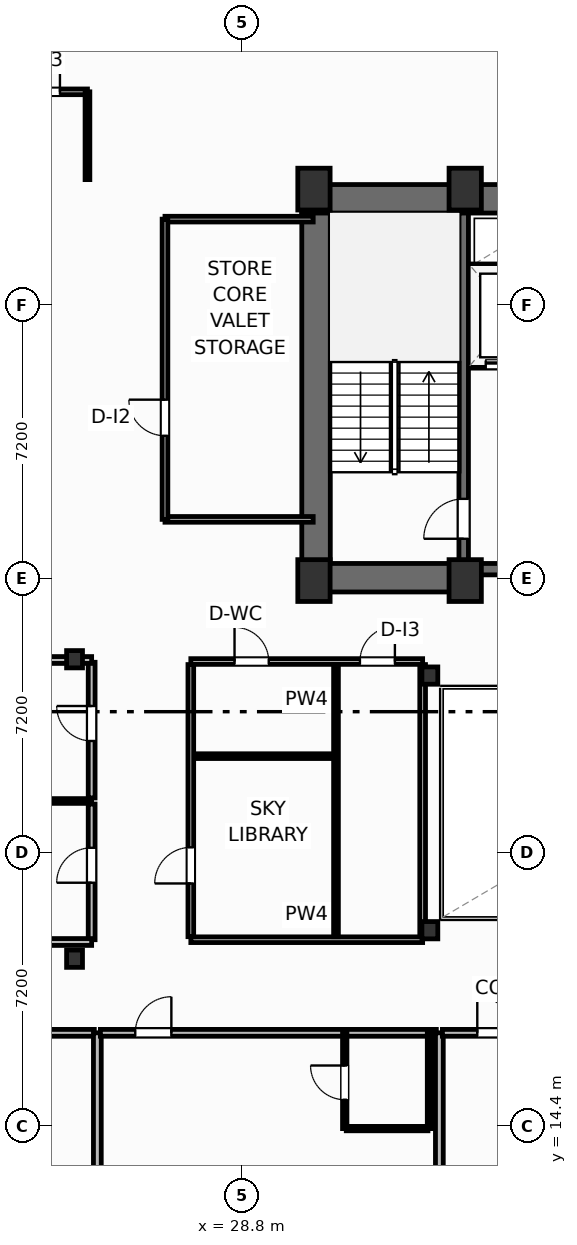
"""IFC4 building model, lengths in metres.
Left out: names, types, materials, properties, quantities, classifications, styles, units other than length and angle.
Written with IfcOpenShell. Run it as: python <this file> out.ifc"""

import sys

from ifc_helpers import new_model, si_unit, direction, frame, frame_2d, origin, origin_2d, place, context, subcontext, project, spatial, rectangle, i_section, extrude, element, fill, save


model = new_model("IFC4")
c1 = context("Model", 3, precision=1e-05, world=origin(), true_north=direction((0.0, 1.0)))
c2 = subcontext(c1, "Body", "Model", "MODEL_VIEW")
j1 = project(units=[si_unit("LENGTHUNIT", "METRE"), si_unit("PLANEANGLEUNIT", "RADIAN")], contexts=[c1])
p1 = place(None, origin())
s1 = spatial("IfcSite", under=j1, at=p1, CompositionType="ELEMENT")
p2 = place(p1, origin())
s2 = spatial("IfcBuilding", under=s1, at=p2, CompositionType="ELEMENT")
p3 = place(p2, frame((0.0, 0.0, 151.3)))
s3 = spatial("IfcBuildingStorey", under=s2, at=p3, CompositionType="ELEMENT", Elevation=151.3)
for number, where, z_axis, x_axis in (
    (1, (30.7, 28.75, 0.0), (0.0, 0.0, 1.0), (1.0, 0.0, 0.0)),
    (2, (34.68, 28.75, 0.0), (0.0, 0.0, 1.0), (1.0, 0.0, 0.0)),
    (3, (30.7, 39.05, 0.0), (0.0, 0.0, 1.0), (1.0, 0.0, 0.0)),
    (4, (34.68, 39.05, 0.0), (0.0, 0.0, 1.0), (1.0, 0.0, 0.0)),
):
    element("IfcColumn", number, at=place(p3, frame(where, z_axis=z_axis, x_axis=x_axis)), inside=s3, PredefinedType="COLUMN", context=c2, shape_type="SweptSolid", body=[
        extrude(rectangle(XDim=0.85, YDim=1.1, at=origin_2d()), origin(), (0.0, 0.0, 1.0), 3.7),
    ])
for number, where, z_axis, x_axis in (
    (5, (33.75, 19.55, 0.0), (0.0, 0.0, 1.0), (1.0, 0.0, 0.0)),
    (6, (33.75, 26.25, 0.0), (0.0, 0.0, 1.0), (1.0, 0.0, 0.0)),
    (7, (24.4, 18.8, 0.0), (0.0, 0.0, 1.0), (1.0, 0.0, 0.0)),
    (8, (24.4, 26.68, 0.0), (0.0, 0.0, 1.0), (1.0, 0.0, 0.0)),
):
    element("IfcColumn", number, at=place(p3, frame(where, z_axis=z_axis, x_axis=x_axis)), inside=s3, PredefinedType="COLUMN", context=c2, shape_type="SweptSolid", body=[
        extrude(i_section(OverallWidth=0.418, OverallDepth=0.455, WebThickness=0.042, FlangeThickness=0.068, FilletRadius=0.025, at=origin_2d()), origin(), (0.0, 0.0, 1.0), 3.7),
    ])
p4 = place(p3, frame((30.38, 38.795, 0.0), z_axis=(0.0, 0.0, 1.0), x_axis=(1.0, 0.0, 0.0)))
e9 = element("IfcWall", 9, at=p4, inside=s3, PredefinedType="SHEAR", context=c2, shape_type="SweptSolid", body=[
    extrude(rectangle(XDim=17.64, YDim=0.75, at=frame_2d((8.82, 0.0))), origin(), (0.0, 0.0, 1.0), 3.45),
])
p5 = place(p3, frame((30.755, 29.2, 0.0), z_axis=(0.0, 0.0, 1.0), x_axis=(0.0, 1.0, 0.0)))
e10 = element("IfcWall", 10, at=p5, inside=s3, PredefinedType="SHEAR", context=c2, shape_type="SweptSolid", body=[
    extrude(rectangle(XDim=9.22, YDim=0.75, at=frame_2d((4.61, 0.0))), origin(), (0.0, 0.0, 1.0), 3.45),
])
p6 = place(p3, frame((30.38, 28.825, 0.0), z_axis=(0.0, 0.0, 1.0), x_axis=(1.0, 0.0, 0.0)))
e11 = element("IfcWall", 11, at=p6, inside=s3, PredefinedType="SHEAR", context=c2, shape_type="SweptSolid", body=[
    extrude(rectangle(XDim=4.42, YDim=0.75, at=frame_2d((2.21, 0.0))), origin(), (0.0, 0.0, 1.0), 3.45),
])
p7 = place(p3, frame((34.8, 29.05, 0.0), z_axis=(0.0, 0.0, 1.0), x_axis=(1.0, 0.0, 0.0)))
e12 = element("IfcWall", 12, at=p7, inside=s3, PredefinedType="SHEAR", context=c2, shape_type="SweptSolid", body=[
    extrude(rectangle(XDim=8.8, YDim=0.3, at=frame_2d((4.4, 0.0))), origin(), (0.0, 0.0, 1.0), 3.45),
])
p8 = place(p7, frame((0.95, 0.0, 0.0)))
e13 = element("IfcOpeningElement", 13, at=p8, cuts=e12, PredefinedType="OPENING", context=c2, shape_type="SweptSolid", body=[
    extrude(rectangle(XDim=1.1, YDim=2.15, at=frame_2d((0.55, 1.075))), frame((0.0, 0.16, 0.0), z_axis=(0.0, -1.0, 0.0), x_axis=(1.0, 0.0, 0.0)), (0.0, 0.0, 1.0), 0.32),
])
p9 = place(p7, frame((6.75, 0.0, 0.0)))
e14 = element("IfcOpeningElement", 14, at=p9, cuts=e12, PredefinedType="OPENING", context=c2, shape_type="SweptSolid", body=[
    extrude(rectangle(XDim=1.1, YDim=2.15, at=frame_2d((0.55, 1.075))), frame((0.0, 0.16, 0.0), z_axis=(0.0, -1.0, 0.0), x_axis=(1.0, 0.0, 0.0)), (0.0, 0.0, 1.0), 0.32),
])
p10 = place(p7, frame((3.32, 0.0, 0.0)))
e15 = element("IfcOpeningElement", 15, at=p10, cuts=e12, PredefinedType="OPENING", context=c2, shape_type="SweptSolid", body=[
    extrude(rectangle(XDim=0.95, YDim=2.15, at=frame_2d((0.475, 1.075))), frame((0.0, 0.16, 0.0), z_axis=(0.0, -1.0, 0.0), x_axis=(1.0, 0.0, 0.0)), (0.0, 0.0, 1.0), 0.32),
])
p11 = place(p3, frame((34.64, 29.2, 0.0), z_axis=(0.0, 0.0, 1.0), x_axis=(0.0, 1.0, 0.0)))
e16 = element("IfcWall", 16, at=p11, inside=s3, PredefinedType="SHEAR", context=c2, shape_type="SweptSolid", body=[
    extrude(rectangle(XDim=9.22, YDim=0.25, at=frame_2d((4.61, 0.0))), origin(), (0.0, 0.0, 1.0), 3.45),
])
p12 = place(p11, frame((0.65, 0.0, 0.0)))
e17 = element("IfcOpeningElement", 17, at=p12, cuts=e16, PredefinedType="OPENING", context=c2, shape_type="SweptSolid", body=[
    extrude(rectangle(XDim=1.05, YDim=2.15, at=frame_2d((0.525, 1.075))), frame((0.0, 0.135, 0.0), z_axis=(0.0, -1.0, 0.0), x_axis=(1.0, 0.0, 0.0)), (0.0, 0.0, 1.0), 0.27),
])
p13 = place(p3, frame((5.0, 41.61, 0.0), z_axis=(0.0, 0.0, 1.0), x_axis=(1.0, 0.0, 0.0)))
e18 = element("IfcWall", 18, at=p13, inside=s3, PredefinedType="PARTITIONING", context=c2, shape_type="SweptSolid", body=[
    extrude(rectangle(XDim=19.74, YDim=0.15, at=frame_2d((9.87, 0.0))), origin(), (0.0, 0.0, 1.0), 3.45),
])
p14 = place(p13, frame((18.096, 0.0, 0.0)))
e19 = element("IfcOpeningElement", 19, at=p14, cuts=e18, PredefinedType="OPENING", context=c2, shape_type="SweptSolid", body=[
    extrude(rectangle(XDim=0.92, YDim=2.05, at=frame_2d((0.46, 1.025))), frame((0.0, 0.085, 0.0), z_axis=(0.0, -1.0, 0.0), x_axis=(1.0, 0.0, 0.0)), (0.0, 0.0, 1.0), 0.17),
])
p15 = place(p3, frame((24.74, 39.3, 0.0), z_axis=(0.0, 0.0, 1.0), x_axis=(0.0, 1.0, 0.0)))
e20 = element("IfcWall", 20, at=p15, inside=s3, PredefinedType="PARTITIONING", context=c2, shape_type="SweptSolid", body=[
    extrude(rectangle(XDim=2.31, YDim=0.125, at=frame_2d((1.155, 0.0))), origin(), (0.0, 0.0, 1.0), 3.45),
])
p16 = place(p3, frame((16.08, 16.85, 0.0), z_axis=(0.0, 0.0, 1.0), x_axis=(1.0, 0.0, 0.0)))
e21 = element("IfcWall", 21, at=p16, inside=s3, PredefinedType="PARTITIONING", context=c2, shape_type="SweptSolid", body=[
    extrude(rectangle(XDim=8.84, YDim=0.18, at=frame_2d((4.42, 0.0))), origin(), (0.0, 0.0, 1.0), 3.45),
])
p17 = place(p16, frame((3.308, 0.0, 0.0)))
e22 = element("IfcOpeningElement", 22, at=p17, cuts=e21, PredefinedType="OPENING", context=c2, shape_type="SweptSolid", body=[
    extrude(rectangle(XDim=0.95, YDim=2.15, at=frame_2d((0.475, 1.075))), frame((0.0, 0.1, 0.0), z_axis=(0.0, -1.0, 0.0), x_axis=(1.0, 0.0, 0.0)), (0.0, 0.0, 1.0), 0.2),
])
p18 = place(p3, frame((25.0, 3.591, 0.0), z_axis=(0.0, 0.0, 1.0), x_axis=(0.0, 1.0, 0.0)))
e23 = element("IfcWall", 23, at=p18, inside=s3, PredefinedType="PARTITIONING", context=c2, shape_type="SweptSolid", body=[
    extrude(rectangle(XDim=13.259, YDim=0.205, at=frame_2d((6.629, 0.0))), origin(), (0.0, 0.0, 1.0), 2.662),
])
p19 = place(p3, frame((25.08, 16.85, 0.0), z_axis=(0.0, 0.0, 1.0), x_axis=(1.0, 0.0, 0.0)))
e24 = element("IfcWall", 24, at=p19, inside=s3, PredefinedType="PARTITIONING", context=c2, shape_type="SweptSolid", body=[
    extrude(rectangle(XDim=8.84, YDim=0.18, at=frame_2d((4.42, 0.0))), origin(), (0.0, 0.0, 1.0), 3.45),
])
p20 = place(p19, frame((0.918, 0.0, 0.0)))
e25 = element("IfcOpeningElement", 25, at=p20, cuts=e24, PredefinedType="OPENING", context=c2, shape_type="SweptSolid", body=[
    extrude(rectangle(XDim=0.95, YDim=2.15, at=frame_2d((0.475, 1.075))), frame((0.0, 0.1, 0.0), z_axis=(0.0, -1.0, 0.0), x_axis=(1.0, 0.0, 0.0)), (0.0, 0.0, 1.0), 0.2),
])
p21 = place(p3, frame((31.55, 14.33, 0.0), z_axis=(0.0, 0.0, 1.0), x_axis=(1.0, 0.0, 0.0)))
e26 = element("IfcWall", 26, at=p21, inside=s3, PredefinedType="PARTITIONING", context=c2, shape_type="SweptSolid", body=[
    extrude(rectangle(XDim=2.15, YDim=0.115, at=frame_2d((1.075, 0.0))), origin(), (0.0, 0.0, 1.0), 3.45),
])
p22 = place(p3, frame((31.51, 14.33, 0.0), z_axis=(0.0, 0.0, 1.0), x_axis=(0.0, 1.0, 0.0)))
e27 = element("IfcWall", 27, at=p22, inside=s3, PredefinedType="PARTITIONING", context=c2, shape_type="SweptSolid", body=[
    extrude(rectangle(XDim=2.52, YDim=0.115, at=frame_2d((1.26, 0.0))), origin(), (0.0, 0.0, 1.0), 3.45),
])
p23 = place(p22, frame((0.76, 0.0, 0.0)))
e28 = element("IfcOpeningElement", 28, at=p23, cuts=e27, PredefinedType="OPENING", context=c2, shape_type="SweptSolid", body=[
    extrude(rectangle(XDim=0.9, YDim=2.05, at=frame_2d((0.45, 1.025))), frame((0.0, 0.067, 0.0), z_axis=(0.0, -1.0, 0.0), x_axis=(1.0, 0.0, 0.0)), (0.0, 0.0, 1.0), 0.135),
])
p24 = place(p3, frame((33.74, 14.33, 0.0), z_axis=(0.0, 0.0, 1.0), x_axis=(0.0, 1.0, 0.0)))
e29 = element("IfcWall", 29, at=p24, inside=s3, PredefinedType="PARTITIONING", context=c2, shape_type="SweptSolid", body=[
    extrude(rectangle(XDim=2.52, YDim=0.115, at=frame_2d((1.26, 0.0))), origin(), (0.0, 0.0, 1.0), 3.45),
])
p25 = place(p3, frame((34.0, 2.5, 0.0), z_axis=(0.0, 0.0, 1.0), x_axis=(0.0, 1.0, 0.0)))
e30 = element("IfcWall", 30, at=p25, inside=s3, PredefinedType="PARTITIONING", context=c2, shape_type="SweptSolid", body=[
    extrude(rectangle(XDim=14.35, YDim=0.205, at=frame_2d((7.175, 0.0))), origin(), (0.0, 0.0, 1.0), 3.45),
])
p26 = place(p3, frame((34.08, 16.85, 0.0), z_axis=(0.0, 0.0, 1.0), x_axis=(1.0, 0.0, 0.0)))
e31 = element("IfcWall", 31, at=p26, inside=s3, PredefinedType="PARTITIONING", context=c2, shape_type="SweptSolid", body=[
    extrude(rectangle(XDim=8.84, YDim=0.18, at=frame_2d((4.42, 0.0))), origin(), (0.0, 0.0, 1.0), 3.45),
])
p27 = place(p26, frame((0.918, 0.0, 0.0)))
e32 = element("IfcOpeningElement", 32, at=p27, cuts=e31, PredefinedType="OPENING", context=c2, shape_type="SweptSolid", body=[
    extrude(rectangle(XDim=0.95, YDim=2.15, at=frame_2d((0.475, 1.075))), frame((0.0, 0.1, 0.0), z_axis=(0.0, -1.0, 0.0), x_axis=(1.0, 0.0, 0.0)), (0.0, 0.0, 1.0), 0.2),
])
p28 = place(p3, frame((24.85, 19.3, 0.0), z_axis=(0.0, 0.0, 1.0), x_axis=(0.0, 1.0, 0.0)))
e33 = element("IfcWall", 33, at=p28, inside=s3, PredefinedType="PARTITIONING", context=c2, shape_type="SweptSolid", body=[
    extrude(rectangle(XDim=3.57, YDim=0.18, at=frame_2d((1.785, 0.0))), origin(), (0.0, 0.0, 1.0), 3.45),
])
p29 = place(p28, frame((1.5, 0.0, 0.0)))
e34 = element("IfcOpeningElement", 34, at=p29, cuts=e33, PredefinedType="OPENING", context=c2, shape_type="SweptSolid", body=[
    extrude(rectangle(XDim=0.92, YDim=2.05, at=frame_2d((0.46, 1.025))), frame((0.0, 0.1, 0.0), z_axis=(0.0, -1.0, 0.0), x_axis=(1.0, 0.0, 0.0)), (0.0, 0.0, 1.0), 0.2),
])
p30 = place(p3, frame((24.85, 23.03, 0.0), z_axis=(0.0, 0.0, 1.0), x_axis=(0.0, 1.0, 0.0)))
e35 = element("IfcWall", 35, at=p30, inside=s3, PredefinedType="PARTITIONING", context=c2, shape_type="SweptSolid", body=[
    extrude(rectangle(XDim=3.57, YDim=0.18, at=frame_2d((1.785, 0.0))), origin(), (0.0, 0.0, 1.0), 3.45),
])
p31 = place(p30, frame((1.5, 0.0, 0.0)))
e36 = element("IfcOpeningElement", 36, at=p31, cuts=e35, PredefinedType="OPENING", context=c2, shape_type="SweptSolid", body=[
    extrude(rectangle(XDim=0.92, YDim=2.05, at=frame_2d((0.46, 1.025))), frame((0.0, 0.1, 0.0), z_axis=(0.0, -1.0, 0.0), x_axis=(1.0, 0.0, 0.0)), (0.0, 0.0, 1.0), 0.2),
])
p32 = place(p3, frame((1.624, 22.95, 0.0), z_axis=(0.0, 0.0, 1.0), x_axis=(1.0, 0.0, 0.0)))
e37 = element("IfcWall", 37, at=p32, inside=s3, PredefinedType="PARTITIONING", context=c2, shape_type="SweptSolid", body=[
    extrude(rectangle(XDim=23.226, YDim=0.125, at=frame_2d((11.613, 0.0))), origin(), (0.0, 0.0, 1.0), 3.45),
])
p33 = place(p3, frame((1.174, 19.24, 0.0), z_axis=(0.0, 0.0, 1.0), x_axis=(1.0, 0.0, 0.0)))
e38 = element("IfcWall", 38, at=p33, inside=s3, PredefinedType="PARTITIONING", context=c2, shape_type="SweptSolid", body=[
    extrude(rectangle(XDim=23.676, YDim=0.18, at=frame_2d((11.838, 0.0))), origin(), (0.0, 0.0, 1.0), 3.45),
])
p34 = place(p3, frame((2.073, 26.66, 0.0), z_axis=(0.0, 0.0, 1.0), x_axis=(1.0, 0.0, 0.0)))
e39 = element("IfcWall", 39, at=p34, inside=s3, PredefinedType="PARTITIONING", context=c2, shape_type="SweptSolid", body=[
    extrude(rectangle(XDim=22.777, YDim=0.18, at=frame_2d((11.388, 0.0))), origin(), (0.0, 0.0, 1.0), 2.662),
])
p35 = place(p3, frame((34.8, 34.44, 0.0), z_axis=(0.0, 0.0, 1.0), x_axis=(1.0, 0.0, 0.0)))
e40 = element("IfcWall", 40, at=p35, inside=s3, PredefinedType="PARTITIONING", context=c2, shape_type="SweptSolid", body=[
    extrude(rectangle(XDim=2.18, YDim=0.2, at=frame_2d((1.09, 0.0))), origin(), (0.0, 0.0, 1.0), 3.45),
])
p36 = place(p35, frame((0.42, 0.0, 0.0)))
e41 = element("IfcOpeningElement", 41, at=p36, cuts=e40, PredefinedType="OPENING", context=c2, shape_type="SweptSolid", body=[
    extrude(rectangle(XDim=1.2, YDim=2.2, at=frame_2d((0.6, 1.1))), frame((0.0, 0.11, 0.0), z_axis=(0.0, -1.0, 0.0), x_axis=(1.0, 0.0, 0.0)), (0.0, 0.0, 1.0), 0.22),
])
p37 = place(p3, frame((34.8, 36.98, 0.0), z_axis=(0.0, 0.0, 1.0), x_axis=(1.0, 0.0, 0.0)))
e42 = element("IfcWall", 42, at=p37, inside=s3, PredefinedType="PARTITIONING", context=c2, shape_type="SweptSolid", body=[
    extrude(rectangle(XDim=2.18, YDim=0.2, at=frame_2d((1.09, 0.0))), origin(), (0.0, 0.0, 1.0), 3.45),
])
p38 = place(p3, frame((27.46, 19.3, 0.0), z_axis=(0.0, 0.0, 1.0), x_axis=(1.0, 0.0, 0.0)))
e43 = element("IfcWall", 43, at=p38, inside=s3, PredefinedType="PARTITIONING", context=c2, shape_type="SweptSolid", body=[
    extrude(rectangle(XDim=6.1, YDim=0.15, at=frame_2d((3.05, 0.0))), origin(), (0.0, 0.0, 1.0), 2.662),
])
p39 = place(p3, frame((27.46, 26.62, 0.0), z_axis=(0.0, 0.0, 1.0), x_axis=(1.0, 0.0, 0.0)))
e44 = element("IfcWall", 44, at=p39, inside=s3, PredefinedType="PARTITIONING", context=c2, shape_type="SweptSolid", body=[
    extrude(rectangle(XDim=6.1, YDim=0.15, at=frame_2d((3.05, 0.0))), origin(), (0.0, 0.0, 1.0), 2.662),
])
p40 = place(p39, frame((1.15, 0.0, 0.0)))
e45 = element("IfcOpeningElement", 45, at=p40, cuts=e44, PredefinedType="OPENING", context=c2, shape_type="SweptSolid", body=[
    extrude(rectangle(XDim=0.9, YDim=2.05, at=frame_2d((0.45, 1.025))), frame((0.0, 0.085, 0.0), z_axis=(0.0, -1.0, 0.0), x_axis=(1.0, 0.0, 0.0)), (0.0, 0.0, 1.0), 0.17),
])
p41 = place(p39, frame((4.45, 0.0, 0.0)))
e46 = element("IfcOpeningElement", 46, at=p41, cuts=e44, PredefinedType="OPENING", context=c2, shape_type="SweptSolid", body=[
    extrude(rectangle(XDim=0.92, YDim=2.05, at=frame_2d((0.46, 1.025))), frame((0.0, 0.085, 0.0), z_axis=(0.0, -1.0, 0.0), x_axis=(1.0, 0.0, 0.0)), (0.0, 0.0, 1.0), 0.17),
])
p42 = place(p3, frame((31.28, 19.38, 0.0), z_axis=(0.0, 0.0, 1.0), x_axis=(0.0, 1.0, 0.0)))
e47 = element("IfcWall", 47, at=p42, inside=s3, PredefinedType="PARTITIONING", context=c2, shape_type="SweptSolid", body=[
    extrude(rectangle(XDim=7.16, YDim=0.125, at=frame_2d((3.58, 0.0))), origin(), (0.0, 0.0, 1.0), 3.45),
])
p43 = place(p3, frame((27.52, 24.13, 0.0), z_axis=(0.0, 0.0, 1.0), x_axis=(1.0, 0.0, 0.0)))
e48 = element("IfcWall", 48, at=p43, inside=s3, PredefinedType="PARTITIONING", context=c2, shape_type="SweptSolid", body=[
    extrude(rectangle(XDim=3.7, YDim=0.125, at=frame_2d((1.85, 0.0))), origin(), (0.0, 0.0, 1.0), 3.45),
])
p44 = place(p3, frame((27.46, 19.38, 0.0), z_axis=(0.0, 0.0, 1.0), x_axis=(0.0, 1.0, 0.0)))
e49 = element("IfcWall", 49, at=p44, inside=s3, PredefinedType="PARTITIONING", context=c2, shape_type="SweptSolid", body=[
    extrude(rectangle(XDim=7.16, YDim=0.15, at=frame_2d((3.58, 0.0))), origin(), (0.0, 0.0, 1.0), 3.45),
])
p45 = place(p44, frame((1.4, 0.0, 0.0)))
e50 = element("IfcOpeningElement", 50, at=p45, cuts=e49, PredefinedType="OPENING", context=c2, shape_type="SweptSolid", body=[
    extrude(rectangle(XDim=0.95, YDim=2.05, at=frame_2d((0.475, 1.025))), frame((0.0, 0.085, 0.0), z_axis=(0.0, -1.0, 0.0), x_axis=(1.0, 0.0, 0.0)), (0.0, 0.0, 1.0), 0.17),
])
p46 = place(p3, frame((33.56, 19.38, 0.0), z_axis=(0.0, 0.0, 1.0), x_axis=(0.0, 1.0, 0.0)))
e51 = element("IfcWall", 51, at=p46, inside=s3, PredefinedType="PARTITIONING", context=c2, shape_type="SweptSolid", body=[
    extrude(rectangle(XDim=7.16, YDim=0.15, at=frame_2d((3.58, 0.0))), origin(), (0.0, 0.0, 1.0), 2.824),
])
for number, where, z_axis, x_axis in (
    (52, (26.78, 30.36, 0.0), (0.0, 0.0, 1.0), (1.0, 0.0, 0.0)),
    (53, (26.78, 38.26, 0.0), (0.0, 0.0, 1.0), (1.0, 0.0, 0.0)),
):
    element("IfcWall", number, at=place(p3, frame(where, z_axis=z_axis, x_axis=x_axis)), inside=s3, PredefinedType="PARTITIONING", context=c2, shape_type="SweptSolid", body=[
        extrude(rectangle(XDim=3.9, YDim=0.15, at=frame_2d((1.95, 0.0))), origin(), (0.0, 0.0, 1.0), 3.45),
    ])
p47 = place(p3, frame((26.78, 30.36, 0.0), z_axis=(0.0, 0.0, 1.0), x_axis=(0.0, 1.0, 0.0)))
e54 = element("IfcWall", 54, at=p47, inside=s3, PredefinedType="PARTITIONING", context=c2, shape_type="SweptSolid", body=[
    extrude(rectangle(XDim=7.9, YDim=0.15, at=frame_2d((3.95, 0.0))), origin(), (0.0, 0.0, 1.0), 3.45),
])
p48 = place(p47, frame((2.2, 0.0, 0.0)))
e55 = element("IfcOpeningElement", 55, at=p48, cuts=e54, PredefinedType="OPENING", context=c2, shape_type="SweptSolid", body=[
    extrude(rectangle(XDim=0.95, YDim=2.05, at=frame_2d((0.475, 1.025))), frame((0.0, 0.085, 0.0), z_axis=(0.0, -1.0, 0.0), x_axis=(1.0, 0.0, 0.0)), (0.0, 0.0, 1.0), 0.17),
])
p49 = place(p14, origin())
e56 = element("IfcDoor", 56, at=p49, inside=s3, OperationType="SINGLE_SWING_RIGHT", PredefinedType="DOOR", context=c2, shape_type="SweptSolid", body=[
    extrude(rectangle(XDim=0.92, YDim=2.05, at=frame_2d((0.46, 1.025))), frame((0.0, 0.025, 0.0), z_axis=(0.0, -1.0, 0.0), x_axis=(1.0, 0.0, 0.0)), (0.0, 0.0, 1.0), 0.05),
])
fill(e19, e56)
p50 = place(p20, origin())
e57 = element("IfcDoor", 57, at=p50, inside=s3, OperationType="SINGLE_SWING_RIGHT", PredefinedType="DOOR", context=c2, shape_type="SweptSolid", body=[
    extrude(rectangle(XDim=0.95, YDim=2.15, at=frame_2d((0.475, 1.075))), frame((0.0, 0.025, 0.0), z_axis=(0.0, -1.0, 0.0), x_axis=(1.0, 0.0, 0.0)), (0.0, 0.0, 1.0), 0.05),
])
fill(e25, e57)
p51 = place(p23, origin())
e58 = element("IfcDoor", 58, at=p51, inside=s3, OperationType="SINGLE_SWING_RIGHT", PredefinedType="DOOR", context=c2, shape_type="SweptSolid", body=[
    extrude(rectangle(XDim=0.9, YDim=2.05, at=frame_2d((0.45, 1.025))), frame((0.0, 0.025, 0.0), z_axis=(0.0, -1.0, 0.0), x_axis=(1.0, 0.0, 0.0)), (0.0, 0.0, 1.0), 0.05),
])
fill(e28, e58)
p52 = place(p27, origin())
e59 = element("IfcDoor", 59, at=p52, inside=s3, OperationType="SINGLE_SWING_LEFT", PredefinedType="DOOR", context=c2, shape_type="SweptSolid", body=[
    extrude(rectangle(XDim=0.95, YDim=2.15, at=frame_2d((0.475, 1.075))), frame((0.0, 0.025, 0.0), z_axis=(0.0, -1.0, 0.0), x_axis=(1.0, 0.0, 0.0)), (0.0, 0.0, 1.0), 0.05),
])
fill(e32, e59)
p53 = place(p29, origin())
e60 = element("IfcDoor", 60, at=p53, inside=s3, OperationType="SINGLE_SWING_LEFT", PredefinedType="DOOR", context=c2, shape_type="SweptSolid", body=[
    extrude(rectangle(XDim=0.92, YDim=2.05, at=frame_2d((0.46, 1.025))), frame((0.0, 0.025, 0.0), z_axis=(0.0, -1.0, 0.0), x_axis=(1.0, 0.0, 0.0)), (0.0, 0.0, 1.0), 0.05),
])
fill(e34, e60)
p54 = place(p31, origin())
e61 = element("IfcDoor", 61, at=p54, inside=s3, OperationType="SINGLE_SWING_RIGHT", PredefinedType="DOOR", context=c2, shape_type="SweptSolid", body=[
    extrude(rectangle(XDim=0.92, YDim=2.05, at=frame_2d((0.46, 1.025))), frame((0.0, 0.025, 0.0), z_axis=(0.0, -1.0, 0.0), x_axis=(1.0, 0.0, 0.0)), (0.0, 0.0, 1.0), 0.05),
])
fill(e36, e61)
p55 = place(p12, origin())
e62 = element("IfcDoor", 62, at=p55, inside=s3, OperationType="SINGLE_SWING_LEFT", PredefinedType="DOOR", context=c2, shape_type="SweptSolid", body=[
    extrude(rectangle(XDim=1.05, YDim=2.15, at=frame_2d((0.525, 1.075))), frame((0.0, 0.025, 0.0), z_axis=(0.0, -1.0, 0.0), x_axis=(1.0, 0.0, 0.0)), (0.0, 0.0, 1.0), 0.05),
])
fill(e17, e62)
p56 = place(p36, origin())
e63 = element("IfcDoor", 63, at=p56, inside=s3, OperationType="SLIDING_TO_LEFT", PredefinedType="DOOR", context=c2, shape_type="SweptSolid", body=[
    extrude(rectangle(XDim=1.2, YDim=2.2, at=frame_2d((0.6, 1.1))), frame((0.0, 0.025, 0.0), z_axis=(0.0, -1.0, 0.0), x_axis=(1.0, 0.0, 0.0)), (0.0, 0.0, 1.0), 0.05),
])
fill(e41, e63)
p57 = place(p40, origin())
e64 = element("IfcDoor", 64, at=p57, inside=s3, OperationType="SINGLE_SWING_LEFT", PredefinedType="DOOR", context=c2, shape_type="SweptSolid", body=[
    extrude(rectangle(XDim=0.9, YDim=2.05, at=frame_2d((0.45, 1.025))), frame((0.0, 0.025, 0.0), z_axis=(0.0, -1.0, 0.0), x_axis=(1.0, 0.0, 0.0)), (0.0, 0.0, 1.0), 0.05),
])
fill(e45, e64)
p58 = place(p41, origin())
e65 = element("IfcDoor", 65, at=p58, inside=s3, OperationType="SINGLE_SWING_RIGHT", PredefinedType="DOOR", context=c2, shape_type="SweptSolid", body=[
    extrude(rectangle(XDim=0.92, YDim=2.05, at=frame_2d((0.46, 1.025))), frame((0.0, 0.025, 0.0), z_axis=(0.0, -1.0, 0.0), x_axis=(1.0, 0.0, 0.0)), (0.0, 0.0, 1.0), 0.05),
])
fill(e46, e65)
p59 = place(p45, origin())
e66 = element("IfcDoor", 66, at=p59, inside=s3, OperationType="SINGLE_SWING_LEFT", PredefinedType="DOOR", context=c2, shape_type="SweptSolid", body=[
    extrude(rectangle(XDim=0.95, YDim=2.05, at=frame_2d((0.475, 1.025))), frame((0.0, 0.025, 0.0), z_axis=(0.0, -1.0, 0.0), x_axis=(1.0, 0.0, 0.0)), (0.0, 0.0, 1.0), 0.05),
])
fill(e50, e66)
p60 = place(p48, origin())
e67 = element("IfcDoor", 67, at=p60, inside=s3, OperationType="SINGLE_SWING_RIGHT", PredefinedType="DOOR", context=c2, shape_type="SweptSolid", body=[
    extrude(rectangle(XDim=0.95, YDim=2.05, at=frame_2d((0.475, 1.025))), frame((0.0, 0.025, 0.0), z_axis=(0.0, -1.0, 0.0), x_axis=(1.0, 0.0, 0.0)), (0.0, 0.0, 1.0), 0.05),
])
fill(e55, e67)
save(model, sys.argv[1])
